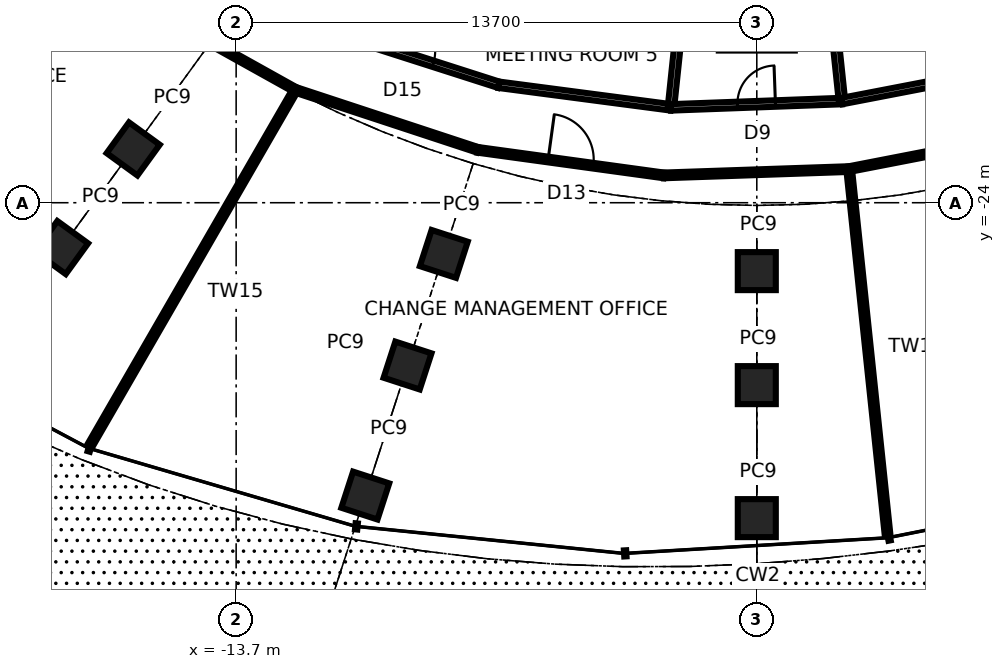
"""IFC4 building model, lengths in metres.
Left out: names, types, materials, properties, quantities, classifications, styles, units other than length and angle.
Written with IfcOpenShell. Run it as: python <this file> out.ifc"""

import sys

from ifc_helpers import new_model, si_unit, direction, frame, frame_2d, origin, origin_2d, place, context, subcontext, project, spatial, rectangle, extrude, element, fill, save


model = new_model("IFC4")
c1 = context("Model", 3, precision=1e-05, world=origin(), true_north=direction((0.0, 1.0)))
c2 = subcontext(c1, "Body", "Model", "MODEL_VIEW")
j1 = project(units=[si_unit("LENGTHUNIT", "METRE"), si_unit("PLANEANGLEUNIT", "RADIAN")], contexts=[c1])
p1 = place(None, origin())
s1 = spatial("IfcSite", under=j1, at=p1, CompositionType="ELEMENT")
p2 = place(p1, origin())
s2 = spatial("IfcBuilding", under=s1, at=p2, CompositionType="ELEMENT")
p3 = place(p2, frame((0.0, 0.0, 5.6)))
s3 = spatial("IfcBuildingStorey", under=s2, at=p3, CompositionType="ELEMENT", Elevation=5.6)
for number, where, z_axis, x_axis in (
    (1, (-10.302, -31.706, 0.0), (0.0, 0.0, 1.0), (-0.309, -0.951, 0.0)),
    (2, (0.0, -32.3, 0.0), (0.0, 0.0, 1.0), (0.0, -1.0, 0.0)),
    (3, (-18.294, -25.18, 0.0), (0.0, 0.0, 1.0), (-0.588, -0.809, 0.0)),
    (4, (-9.19, -28.285, 0.0), (0.0, 0.0, 1.0), (-0.309, -0.951, 0.0)),
    (5, (0.0, -28.8, 0.0), (0.0, 0.0, 1.0), (0.0, -1.0, 0.0)),
    (6, (-16.409, -22.584, 0.0), (0.0, 0.0, 1.0), (-0.588, -0.809, 0.0)),
    (7, (-8.236, -25.347, 0.0), (0.0, 0.0, 1.0), (-0.309, -0.951, 0.0)),
    (8, (0.0, -25.8, 0.0), (0.0, 0.0, 1.0), (0.0, -1.0, 0.0)),
):
    element("IfcColumn", number, at=place(p3, frame(where, z_axis=z_axis, x_axis=x_axis)), inside=s3, PredefinedType="COLUMN", context=c2, shape_type="SweptSolid", body=[
        extrude(rectangle(XDim=1.0, YDim=1.0, at=origin_2d()), origin(), (0.0, 0.0, 1.0), 5.0),
    ])
p4 = place(p3, frame((-16.664, -18.507, 0.0), z_axis=(0.0, 0.0, 1.0), x_axis=(0.873440229319, -0.486931376898, 0.0)))
e9 = element("IfcWall", 9, at=p4, inside=s3, PredefinedType="PARTITIONING", context=c2, shape_type="SweptSolid", body=[
    extrude(rectangle(XDim=5.178, YDim=0.15, at=frame_2d((2.589, 0.0))), origin(), (0.0, 0.0, 1.0), 4.8),
])
p5 = place(p3, frame((-12.141, -21.029, 0.0), z_axis=(0.0, 0.0, 1.0), x_axis=(-0.500001376791, -0.866024608893, 0.0)))
e10 = element("IfcWall", 10, at=p5, inside=s3, PredefinedType="PARTITIONING", context=c2, shape_type="SweptSolid", body=[
    extrude(rectangle(XDim=10.81, YDim=0.15, at=frame_2d((5.405, 0.0))), origin(), (0.0, 0.0, 1.0), 4.8),
])
p6 = place(p3, frame((-6.79, -20.896, 0.0), z_axis=(0.0, 0.0, 1.0), x_axis=(-0.952311283162, 0.305128202503, 0.0)))
e11 = element("IfcWall", 11, at=p6, inside=s3, PredefinedType="PARTITIONING", context=c2, shape_type="SweptSolid", body=[
    extrude(rectangle(XDim=4.674, YDim=0.17, at=frame_2d((2.337, 0.0))), origin(), (0.0, 0.0, 1.0), 4.8),
])
p7 = place(p6, frame((1.812, 0.0, 0.0)))
e12 = element("IfcOpeningElement", 12, at=p7, cuts=e11, PredefinedType="OPENING", context=c2, shape_type="SweptSolid", body=[
    extrude(rectangle(XDim=1.1, YDim=2.4, at=frame_2d((0.55, 1.2))), frame((0.0, 0.095, 0.0), z_axis=(0.0, -1.0, 0.0), x_axis=(1.0, 0.0, 0.0)), (0.0, 0.0, 1.0), 0.19),
])
p8 = place(p3, frame((-12.141, -21.029, 0.0), z_axis=(0.0, 0.0, 1.0), x_axis=(0.949808812445, -0.312830976412, 0.0)))
e13 = element("IfcWall", 13, at=p8, inside=s3, PredefinedType="PARTITIONING", context=c2, shape_type="SweptSolid", body=[
    extrude(rectangle(XDim=5.049, YDim=0.15, at=frame_2d((2.524, 0.0))), origin(), (0.0, 0.0, 1.0), 4.8),
])
p9 = place(p3, frame((-2.259, -21.491, 0.0), z_axis=(0.0, 0.0, 1.0), x_axis=(-0.991487722643, 0.130200214467, 0.0)))
e14 = element("IfcWall", 14, at=p9, inside=s3, PredefinedType="PARTITIONING", context=c2, shape_type="SweptSolid", body=[
    extrude(rectangle(XDim=4.57, YDim=0.17, at=frame_2d((2.285, 0.0))), origin(), (0.0, 0.0, 1.0), 4.8),
])
p10 = place(p3, frame((-7.346, -22.608, 0.0), z_axis=(0.0, 0.0, 1.0), x_axis=(0.990692659729, -0.136117794422, 0.0)))
e15 = element("IfcWall", 15, at=p10, inside=s3, PredefinedType="PARTITIONING", context=c2, shape_type="SweptSolid", body=[
    extrude(rectangle(XDim=4.945, YDim=0.15, at=frame_2d((2.473, 0.0))), origin(), (0.0, 0.0, 1.0), 4.8),
])
p11 = place(p10, frame((1.872, 0.0, 0.0)))
e16 = element("IfcOpeningElement", 16, at=p11, cuts=e15, PredefinedType="OPENING", context=c2, shape_type="SweptSolid", body=[
    extrude(rectangle(XDim=1.2, YDim=2.4, at=frame_2d((0.6, 1.2))), frame((0.0, 0.085, 0.0), z_axis=(0.0, -1.0, 0.0), x_axis=(1.0, 0.0, 0.0)), (0.0, 0.0, 1.0), 0.17),
])
p12 = place(p3, frame((-2.259, -21.491, 0.0), z_axis=(0.0, 0.0, 1.0), x_axis=(0.104519836442, 0.994522802046, 0.0)))
e17 = element("IfcWall", 17, at=p12, inside=s3, PredefinedType="PARTITIONING", context=c2, shape_type="SweptSolid", body=[
    extrude(rectangle(XDim=10.247, YDim=0.17, at=frame_2d((5.124, 0.0))), origin(), (0.0, 0.0, 1.0), 4.8),
])
p13 = place(p3, frame((2.241, -21.325, 0.0), z_axis=(0.0, 0.0, 1.0), x_axis=(-0.999316169957, -0.03697556575, 0.0)))
e18 = element("IfcWall", 18, at=p13, inside=s3, PredefinedType="PARTITIONING", context=c2, shape_type="SweptSolid", body=[
    extrude(rectangle(XDim=4.503, YDim=0.17, at=frame_2d((2.251, 0.0))), origin(), (0.0, 0.0, 1.0), 4.8),
])
p14 = place(p13, frame((1.752, 0.0, 0.0)))
e19 = element("IfcOpeningElement", 19, at=p14, cuts=e18, PredefinedType="OPENING", context=c2, shape_type="SweptSolid", body=[
    extrude(rectangle(XDim=1.0, YDim=2.4, at=frame_2d((0.5, 1.2))), frame((0.0, 0.095, 0.0), z_axis=(0.0, -1.0, 0.0), x_axis=(1.0, 0.0, 0.0)), (0.0, 0.0, 1.0), 0.19),
])
p15 = place(p3, frame((-2.447, -23.281, 0.0), z_axis=(0.0, 0.0, 1.0), x_axis=(0.999419294802, 0.034074523869, 0.0)))
e20 = element("IfcWall", 20, at=p15, inside=s3, PredefinedType="PARTITIONING", context=c2, shape_type="SweptSolid", body=[
    extrude(rectangle(XDim=4.879, YDim=0.15, at=frame_2d((2.44, 0.0))), origin(), (0.0, 0.0, 1.0), 4.8),
])
p16 = place(p3, frame((1.188, -11.3, 0.0), z_axis=(0.0, 0.0, 1.0), x_axis=(0.104512053293, -0.994523619989, 0.0)))
e21 = element("IfcWall", 21, at=p16, inside=s3, PredefinedType="PARTITIONING", context=c2, shape_type="SweptSolid", body=[
    extrude(rectangle(XDim=10.08, YDim=0.17, at=frame_2d((5.04, 0.0))), origin(), (0.0, 0.0, 1.0), 4.8),
])
p17 = place(p3, frame((2.429, -23.115, 0.0), z_axis=(0.0, 0.0, 1.0), x_axis=(0.104544233856, -0.994520237686, 0.0)))
e22 = element("IfcWall", 22, at=p17, inside=s3, PredefinedType="PARTITIONING", context=c2, shape_type="SweptSolid", body=[
    extrude(rectangle(XDim=9.675, YDim=0.15, at=frame_2d((4.837, 0.0))), origin(), (0.0, 0.0, 1.0), 4.8),
])
p18 = place(p3, frame((2.429, -23.115, 0.0), z_axis=(0.0, 0.0, 1.0), x_axis=(0.981647737098, 0.190703225592, 0.0)))
e23 = element("IfcWall", 23, at=p18, inside=s3, PredefinedType="PARTITIONING", context=c2, shape_type="SweptSolid", body=[
    extrude(rectangle(XDim=4.869, YDim=0.15, at=frame_2d((2.434, 0.0))), origin(), (0.0, 0.0, 1.0), 4.8),
])
p19 = place(p3, frame((6.653, -20.475, 0.0), z_axis=(0.0, 0.0, 1.0), x_axis=(-0.981933890717, -0.189224296169, 0.0)))
e24 = element("IfcWall", 24, at=p19, inside=s3, PredefinedType="PARTITIONING", context=c2, shape_type="SweptSolid", body=[
    extrude(rectangle(XDim=4.492, YDim=0.17, at=frame_2d((2.246, 0.0))), origin(), (0.0, 0.0, 1.0), 4.8),
])
p20 = place(p14, frame((1.0, 0.0, 0.0), z_axis=(0.0, 0.0, 1.0), x_axis=(-1.0, 0.0, 0.0)))
e25 = element("IfcDoor", 25, at=p20, inside=s3, OperationType="SINGLE_SWING_RIGHT", PredefinedType="DOOR", context=c2, shape_type="SweptSolid", body=[
    extrude(rectangle(XDim=1.0, YDim=2.4, at=frame_2d((0.5, 1.2))), frame((0.0, 0.025, 0.0), z_axis=(0.0, -1.0, 0.0), x_axis=(1.0, 0.0, 0.0)), (0.0, 0.0, 1.0), 0.05),
])
fill(e19, e25)
p21 = place(p7, frame((1.1, 0.0, 0.0), z_axis=(0.0, 0.0, 1.0), x_axis=(-1.0, 0.0, 0.0)))
e26 = element("IfcDoor", 26, at=p21, inside=s3, OperationType="SINGLE_SWING_LEFT", PredefinedType="DOOR", context=c2, shape_type="SweptSolid", body=[
    extrude(rectangle(XDim=1.1, YDim=2.4, at=frame_2d((0.55, 1.2))), frame((0.0, 0.025, 0.0), z_axis=(0.0, -1.0, 0.0), x_axis=(1.0, 0.0, 0.0)), (0.0, 0.0, 1.0), 0.05),
])
fill(e12, e26)
p22 = place(p11, origin())
e27 = element("IfcDoor", 27, at=p22, inside=s3, OperationType="SINGLE_SWING_LEFT", PredefinedType="DOOR", context=c2, shape_type="SweptSolid", body=[
    extrude(rectangle(XDim=1.2, YDim=2.4, at=frame_2d((0.6, 1.2))), frame((0.0, 0.025, 0.0), z_axis=(0.0, -1.0, 0.0), x_axis=(1.0, 0.0, 0.0)), (0.0, 0.0, 1.0), 0.05),
])
fill(e16, e27)
save(model, sys.argv[1])
